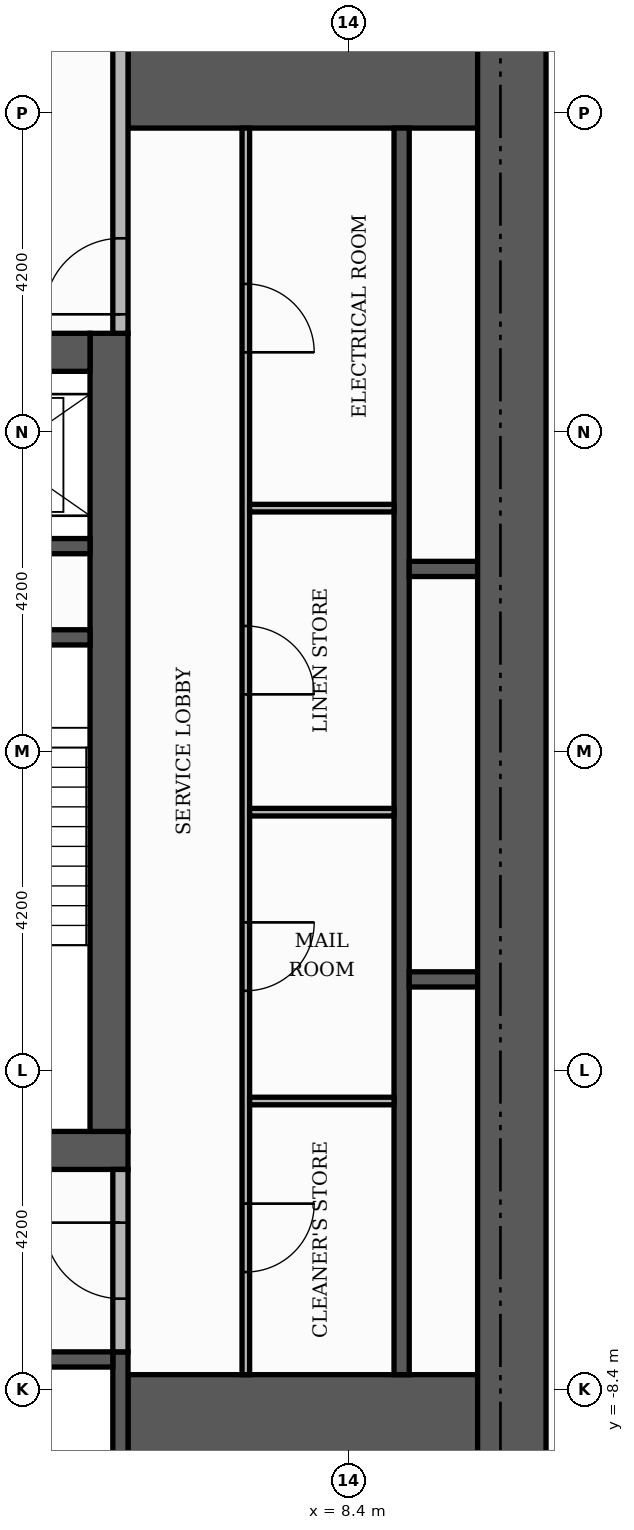
"""IFC4 building model, lengths in metres.
Left out: names, types, materials, properties, quantities, classifications, styles, units other than length and angle.
Written with IfcOpenShell. Run it as: python <this file> out.ifc"""

import sys

from ifc_helpers import new_model, si_unit, direction, frame, frame_2d, origin, place, context, subcontext, project, spatial, rectangle, extrude, element, fill, save


model = new_model("IFC4")
c1 = context("Model", 3, precision=1e-05, world=origin(), true_north=direction((0.0, 1.0)))
c2 = subcontext(c1, "Body", "Model", "MODEL_VIEW")
j1 = project(units=[si_unit("LENGTHUNIT", "METRE"), si_unit("PLANEANGLEUNIT", "RADIAN")], contexts=[c1])
p1 = place(None, origin())
s1 = spatial("IfcSite", under=j1, at=p1, CompositionType="ELEMENT")
p2 = place(p1, origin())
s2 = spatial("IfcBuilding", under=s1, at=p2, CompositionType="ELEMENT")
p3 = place(p2, frame((0.0, 0.0, 34.8)))
s3 = spatial("IfcBuildingStorey", under=s2, at=p3, CompositionType="ELEMENT", Elevation=34.8)
p4 = place(p3, frame((-5.5, -5.25, 0.0), z_axis=(0.0, 0.0, 1.0), x_axis=(1.0, 0.0, 0.0)))
e1 = element("IfcWall", 1, at=p4, inside=s3, PredefinedType="SHEAR", context=c2, shape_type="SweptSolid", body=[
    extrude(rectangle(XDim=11.0, YDim=0.5, at=frame_2d((5.5, 0.0))), origin(), (0.0, 0.0, 1.0), 3.48),
])
p5 = place(p4, frame((4.9, 0.0, 0.0)))
e2 = element("IfcOpeningElement", 2, at=p5, cuts=e1, PredefinedType="OPENING", context=c2, shape_type="SweptSolid", body=[
    extrude(rectangle(XDim=1.2, YDim=2.1, at=frame_2d((0.6, 1.05))), frame((0.0, 0.26, 0.0), z_axis=(0.0, -1.0, 0.0), x_axis=(1.0, 0.0, 0.0)), (0.0, 0.0, 1.0), 0.52),
])
p6 = place(p3, frame((5.25, -5.0, 0.0), z_axis=(0.0, 0.0, 1.0), x_axis=(0.0, 1.0, 0.0)))
e3 = element("IfcWall", 3, at=p6, inside=s3, PredefinedType="SHEAR", context=c2, shape_type="SweptSolid", body=[
    extrude(rectangle(XDim=10.5, YDim=0.5, at=frame_2d((5.25, 0.0))), origin(), (0.0, 0.0, 1.0), 3.48),
])
p7 = place(p3, frame((-5.0, 5.25, 0.0), z_axis=(0.0, 0.0, 1.0), x_axis=(1.0, 0.0, 0.0)))
e4 = element("IfcWall", 4, at=p7, inside=s3, PredefinedType="SHEAR", context=c2, shape_type="SweptSolid", body=[
    extrude(rectangle(XDim=10.0, YDim=0.5, at=frame_2d((5.0, 0.0))), origin(), (0.0, 0.0, 1.0), 3.48),
])
p8 = place(p7, frame((4.4, 0.0, 0.0)))
e5 = element("IfcOpeningElement", 5, at=p8, cuts=e4, PredefinedType="OPENING", context=c2, shape_type="SweptSolid", body=[
    extrude(rectangle(XDim=1.2, YDim=2.1, at=frame_2d((0.6, 1.05))), frame((0.0, 0.26, 0.0), z_axis=(0.0, -1.0, 0.0), x_axis=(1.0, 0.0, 0.0)), (0.0, 0.0, 1.0), 0.52),
])
for number, where, z_axis, x_axis in (
    (6, (5.5, -9.15, 0.0), (0.0, 0.0, 1.0), (1.0, 0.0, 0.0)),
    (7, (5.5, 9.15, 0.0), (0.0, 0.0, 1.0), (1.0, 0.0, 0.0)),
):
    element("IfcWall", number, at=place(p3, frame(where, z_axis=z_axis, x_axis=x_axis)), inside=s3, PredefinedType="SHEAR", context=c2, shape_type="SweptSolid", body=[
        extrude(rectangle(XDim=4.6, YDim=1.9, at=frame_2d((2.3, 0.0))), origin(), (0.0, 0.0, 1.0), 3.48),
    ])
p9 = place(p3, frame((2.15, 1.5, 0.0), z_axis=(0.0, 0.0, 1.0), x_axis=(1.0, 0.0, 0.0)))
e8 = element("IfcWall", 8, at=p9, inside=s3, PredefinedType="SHEAR", context=c2, shape_type="SweptSolid", body=[
    extrude(rectangle(XDim=2.85, YDim=0.2, at=frame_2d((1.425, 0.0))), origin(), (0.0, 0.0, 1.0), 3.48),
])
p10 = place(p3, frame((5.4, -10.1, 0.0), z_axis=(0.0, 0.0, 1.0), x_axis=(0.0, 1.0, 0.0)))
e9 = element("IfcWall", 9, at=p10, inside=s3, PredefinedType="SHEAR", context=c2, shape_type="SweptSolid", body=[
    extrude(rectangle(XDim=2.2, YDim=0.2, at=frame_2d((1.1, 0.0))), origin(), (0.0, 0.0, 1.0), 3.48),
])
p11 = place(p3, frame((9.1, -8.2, 0.0), z_axis=(0.0, 0.0, 1.0), x_axis=(0.0, 1.0, 0.0)))
e10 = element("IfcWall", 10, at=p11, inside=s3, PredefinedType="SHEAR", context=c2, shape_type="SweptSolid", body=[
    extrude(rectangle(XDim=16.4, YDim=0.2, at=frame_2d((8.2, 0.0))), origin(), (0.0, 0.0, 1.0), 3.48),
])
p12 = place(p3, frame((2.8, -8.0, 0.0), z_axis=(0.0, 0.0, 1.0), x_axis=(1.0, 0.0, 0.0)))
e11 = element("IfcWall", 11, at=p12, inside=s3, PredefinedType="SHEAR", context=c2, shape_type="SweptSolid", body=[
    extrude(rectangle(XDim=2.5, YDim=0.2, at=frame_2d((1.25, 0.0))), origin(), (0.0, 0.0, 1.0), 3.48),
])
for number, where, z_axis, x_axis in (
    (12, (9.2, -3.0, 0.0), (0.0, 0.0, 1.0), (1.0, 0.0, 0.0)),
    (13, (9.2, 2.4, 0.0), (0.0, 0.0, 1.0), (1.0, 0.0, 0.0)),
):
    element("IfcWall", number, at=place(p3, frame(where, z_axis=z_axis, x_axis=x_axis)), inside=s3, PredefinedType="SHEAR", context=c2, shape_type="SweptSolid", body=[
        extrude(rectangle(XDim=0.9, YDim=0.2, at=frame_2d((0.45, 0.0))), origin(), (0.0, 0.0, 1.0), 3.48),
    ])
p13 = place(p3, frame((2.15, 2.7, 0.0), z_axis=(0.0, 0.0, 1.0), x_axis=(1.0, 0.0, 0.0)))
e14 = element("IfcWall", 14, at=p13, inside=s3, PredefinedType="SHEAR", context=c2, shape_type="SweptSolid", body=[
    extrude(rectangle(XDim=2.85, YDim=0.2, at=frame_2d((1.425, 0.0))), origin(), (0.0, 0.0, 1.0), 3.48),
])
p14 = place(p3, frame((10.55, -10.1, 0.0), z_axis=(0.0, 0.0, 1.0), x_axis=(0.0, 1.0, 0.0)))
e15 = element("IfcWall", 15, at=p14, inside=s3, PredefinedType="SHEAR", context=c2, shape_type="SweptSolid", body=[
    extrude(rectangle(XDim=20.2, YDim=0.9, at=frame_2d((10.1, 0.0))), origin(), (0.0, 0.0, 1.0), 3.48),
])
p15 = place(p3, frame((7.05, -8.2, 0.0), z_axis=(0.0, 0.0, 1.0), x_axis=(0.0, 1.0, 0.0)))
e16 = element("IfcWall", 16, at=p15, inside=s3, PredefinedType="PARTITIONING", context=c2, shape_type="SweptSolid", body=[
    extrude(rectangle(XDim=16.4, YDim=0.1, at=frame_2d((8.2, 0.0))), origin(), (0.0, 0.0, 1.0), 3.48),
])
p16 = place(p15, frame((1.35, 0.0, 0.0)))
e17 = element("IfcOpeningElement", 17, at=p16, cuts=e16, PredefinedType="OPENING", context=c2, shape_type="SweptSolid", body=[
    extrude(rectangle(XDim=0.9, YDim=2.1, at=frame_2d((0.45, 1.05))), frame((0.0, 0.06, 0.0), z_axis=(0.0, -1.0, 0.0), x_axis=(1.0, 0.0, 0.0)), (0.0, 0.0, 1.0), 0.12),
])
p17 = place(p15, frame((5.05, 0.0, 0.0)))
e18 = element("IfcOpeningElement", 18, at=p17, cuts=e16, PredefinedType="OPENING", context=c2, shape_type="SweptSolid", body=[
    extrude(rectangle(XDim=0.9, YDim=2.1, at=frame_2d((0.45, 1.05))), frame((0.0, 0.06, 0.0), z_axis=(0.0, -1.0, 0.0), x_axis=(1.0, 0.0, 0.0)), (0.0, 0.0, 1.0), 0.12),
])
p18 = place(p15, frame((8.95, 0.0, 0.0)))
e19 = element("IfcOpeningElement", 19, at=p18, cuts=e16, PredefinedType="OPENING", context=c2, shape_type="SweptSolid", body=[
    extrude(rectangle(XDim=0.9, YDim=2.1, at=frame_2d((0.45, 1.05))), frame((0.0, 0.06, 0.0), z_axis=(0.0, -1.0, 0.0), x_axis=(1.0, 0.0, 0.0)), (0.0, 0.0, 1.0), 0.12),
])
p19 = place(p15, frame((13.45, 0.0, 0.0)))
e20 = element("IfcOpeningElement", 20, at=p19, cuts=e16, PredefinedType="OPENING", context=c2, shape_type="SweptSolid", body=[
    extrude(rectangle(XDim=0.9, YDim=2.1, at=frame_2d((0.45, 1.05))), frame((0.0, 0.06, 0.0), z_axis=(0.0, -1.0, 0.0), x_axis=(1.0, 0.0, 0.0)), (0.0, 0.0, 1.0), 0.12),
])
p20 = place(p3, frame((5.4, -7.9, 0.0), z_axis=(0.0, 0.0, 1.0), x_axis=(0.0, 1.0, 0.0)))
e21 = element("IfcWall", 21, at=p20, inside=s3, PredefinedType="PARTITIONING", context=c2, shape_type="SweptSolid", body=[
    extrude(rectangle(XDim=2.4, YDim=0.2, at=frame_2d((1.2, 0.0))), origin(), (0.0, 0.0, 1.0), 3.48),
])
p21 = place(p20, frame((0.7, 0.0, 0.0)))
e22 = element("IfcOpeningElement", 22, at=p21, cuts=e21, PredefinedType="OPENING", context=c2, shape_type="SweptSolid", body=[
    extrude(rectangle(XDim=1.0, YDim=2.1, at=frame_2d((0.5, 1.05))), frame((0.0, 0.11, 0.0), z_axis=(0.0, -1.0, 0.0), x_axis=(1.0, 0.0, 0.0)), (0.0, 0.0, 1.0), 0.22),
])
for number, where, z_axis, x_axis in (
    (23, (7.1, -4.6, 0.0), (0.0, 0.0, 1.0), (1.0, 0.0, 0.0)),
    (24, (7.1, -0.8, 0.0), (0.0, 0.0, 1.0), (1.0, 0.0, 0.0)),
    (25, (7.1, 3.2, 0.0), (0.0, 0.0, 1.0), (1.0, 0.0, 0.0)),
):
    element("IfcWall", number, at=place(p3, frame(where, z_axis=z_axis, x_axis=x_axis)), inside=s3, PredefinedType="PARTITIONING", context=c2, shape_type="SweptSolid", body=[
        extrude(rectangle(XDim=1.9, YDim=0.1, at=frame_2d((0.95, 0.0))), origin(), (0.0, 0.0, 1.0), 3.48),
    ])
p22 = place(p3, frame((5.4, 5.5, 0.0), z_axis=(0.0, 0.0, 1.0), x_axis=(0.0, 1.0, 0.0)))
e26 = element("IfcWall", 26, at=p22, inside=s3, PredefinedType="PARTITIONING", context=c2, shape_type="SweptSolid", body=[
    extrude(rectangle(XDim=4.6, YDim=0.2, at=frame_2d((2.3, 0.0))), origin(), (0.0, 0.0, 1.0), 3.48),
])
p23 = place(p22, frame((0.25, 0.0, 0.0)))
e27 = element("IfcOpeningElement", 27, at=p23, cuts=e26, PredefinedType="OPENING", context=c2, shape_type="SweptSolid", body=[
    extrude(rectangle(XDim=1.0, YDim=2.1, at=frame_2d((0.5, 1.05))), frame((0.0, 0.11, 0.0), z_axis=(0.0, -1.0, 0.0), x_axis=(1.0, 0.0, 0.0)), (0.0, 0.0, 1.0), 0.22),
])
p24 = place(p23, origin())
e28 = element("IfcDoor", 28, at=p24, inside=s3, OperationType="SINGLE_SWING_LEFT", PredefinedType="DOOR", context=c2, shape_type="SweptSolid", body=[
    extrude(rectangle(XDim=1.0, YDim=2.1, at=frame_2d((0.5, 1.05))), frame((0.0, 0.025, 0.0), z_axis=(0.0, -1.0, 0.0), x_axis=(1.0, 0.0, 0.0)), (0.0, 0.0, 1.0), 0.05),
])
fill(e27, e28)
p25 = place(p21, origin())
e29 = element("IfcDoor", 29, at=p25, inside=s3, OperationType="SINGLE_SWING_RIGHT", PredefinedType="DOOR", context=c2, shape_type="SweptSolid", body=[
    extrude(rectangle(XDim=1.0, YDim=2.1, at=frame_2d((0.5, 1.05))), frame((0.0, 0.025, 0.0), z_axis=(0.0, -1.0, 0.0), x_axis=(1.0, 0.0, 0.0)), (0.0, 0.0, 1.0), 0.05),
])
fill(e22, e29)
p26 = place(p16, frame((0.9, 0.0, 0.0), z_axis=(0.0, 0.0, 1.0), x_axis=(-1.0, 0.0, 0.0)))
e30 = element("IfcDoor", 30, at=p26, inside=s3, OperationType="SINGLE_SWING_RIGHT", PredefinedType="DOOR", context=c2, shape_type="SweptSolid", body=[
    extrude(rectangle(XDim=0.9, YDim=2.1, at=frame_2d((0.45, 1.05))), frame((0.0, 0.025, 0.0), z_axis=(0.0, -1.0, 0.0), x_axis=(1.0, 0.0, 0.0)), (0.0, 0.0, 1.0), 0.05),
])
fill(e17, e30)
p27 = place(p17, frame((0.9, 0.0, 0.0), z_axis=(0.0, 0.0, 1.0), x_axis=(-1.0, 0.0, 0.0)))
e31 = element("IfcDoor", 31, at=p27, inside=s3, OperationType="SINGLE_SWING_RIGHT", PredefinedType="DOOR", context=c2, shape_type="SweptSolid", body=[
    extrude(rectangle(XDim=0.9, YDim=2.1, at=frame_2d((0.45, 1.05))), frame((0.0, 0.025, 0.0), z_axis=(0.0, -1.0, 0.0), x_axis=(1.0, 0.0, 0.0)), (0.0, 0.0, 1.0), 0.05),
])
fill(e18, e31)
p28 = place(p18, frame((0.9, 0.0, 0.0), z_axis=(0.0, 0.0, 1.0), x_axis=(-1.0, 0.0, 0.0)))
e32 = element("IfcDoor", 32, at=p28, inside=s3, OperationType="SINGLE_SWING_LEFT", PredefinedType="DOOR", context=c2, shape_type="SweptSolid", body=[
    extrude(rectangle(XDim=0.9, YDim=2.1, at=frame_2d((0.45, 1.05))), frame((0.0, 0.025, 0.0), z_axis=(0.0, -1.0, 0.0), x_axis=(1.0, 0.0, 0.0)), (0.0, 0.0, 1.0), 0.05),
])
fill(e19, e32)
p29 = place(p19, frame((0.9, 0.0, 0.0), z_axis=(0.0, 0.0, 1.0), x_axis=(-1.0, 0.0, 0.0)))
e33 = element("IfcDoor", 33, at=p29, inside=s3, OperationType="SINGLE_SWING_LEFT", PredefinedType="DOOR", context=c2, shape_type="SweptSolid", body=[
    extrude(rectangle(XDim=0.9, YDim=2.1, at=frame_2d((0.45, 1.05))), frame((0.0, 0.025, 0.0), z_axis=(0.0, -1.0, 0.0), x_axis=(1.0, 0.0, 0.0)), (0.0, 0.0, 1.0), 0.05),
])
fill(e20, e33)
save(model, sys.argv[1])
